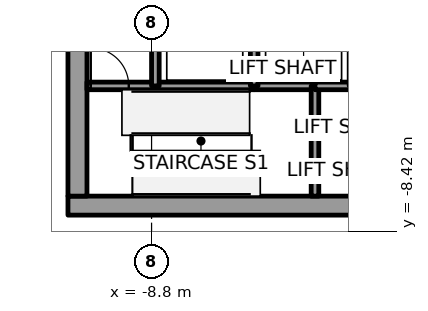
"""IFC4 building model, lengths in metres.
Left out: names, types, materials, properties, quantities, classifications, styles, units other than length and angle.
Written with IfcOpenShell. Run it as: python <this file> out.ifc"""

import sys

from ifc_helpers import new_model, si_unit, direction, frame, frame_2d, origin, place, context, subcontext, project, spatial, rectangle, extrude, element, fill, save


model = new_model("IFC4")
c1 = context("Model", 3, precision=1e-05, world=origin(), true_north=direction((0.0, 1.0)))
c2 = subcontext(c1, "Body", "Model", "MODEL_VIEW")
j1 = project(units=[si_unit("LENGTHUNIT", "METRE"), si_unit("PLANEANGLEUNIT", "RADIAN")], contexts=[c1])
p1 = place(None, origin())
s1 = spatial("IfcSite", under=j1, at=p1, CompositionType="ELEMENT")
p2 = place(p1, origin())
s2 = spatial("IfcBuilding", under=s1, at=p2, CompositionType="ELEMENT")
p3 = place(p2, frame((0.0, 0.0, 201.8)))
s3 = spatial("IfcBuildingStorey", under=s2, at=p3, CompositionType="ELEMENT", Elevation=201.8)
p4 = place(p3, frame((-11.0, -7.75, 0.0), z_axis=(0.0, 0.0, 1.0), x_axis=(1.0, 0.0, 0.0)))
e1 = element("IfcWall", 1, at=p4, inside=s3, PredefinedType="SHEAR", context=c2, shape_type="SweptSolid", body=[
    extrude(rectangle(XDim=22.0, YDim=0.5, at=frame_2d((11.0, 0.0))), origin(), (0.0, 0.0, 1.0), 4.0),
])
p5 = place(p4, frame((10.45, 0.0, 0.0)))
e2 = element("IfcOpeningElement", 2, at=p5, cuts=e1, PredefinedType="OPENING", context=c2, shape_type="SweptSolid", body=[
    extrude(rectangle(XDim=1.1, YDim=2.1, at=frame_2d((0.55, 1.05))), frame((0.0, 0.25, 0.0), z_axis=(0.0, -1.0, 0.0), x_axis=(1.0, 0.0, 0.0)), (0.0, 0.0, 1.0), 0.5),
])
p6 = place(p3, frame((-10.75, -7.5, 0.0), z_axis=(0.0, 0.0, 1.0), x_axis=(0.0, 1.0, 0.0)))
e3 = element("IfcWall", 3, at=p6, inside=s3, PredefinedType="SHEAR", context=c2, shape_type="SweptSolid", body=[
    extrude(rectangle(XDim=15.0, YDim=0.5, at=frame_2d((7.5, 0.0))), origin(), (0.0, 0.0, 1.0), 4.0),
])
p7 = place(p6, frame((6.6, 0.0, 0.0)))
e4 = element("IfcOpeningElement", 4, at=p7, cuts=e3, PredefinedType="OPENING", context=c2, shape_type="SweptSolid", body=[
    extrude(rectangle(XDim=1.8, YDim=2.1, at=frame_2d((0.9, 1.05))), frame((0.0, 0.25, 0.0), z_axis=(0.0, -1.0, 0.0), x_axis=(1.0, 0.0, 0.0)), (0.0, 0.0, 1.0), 0.5),
])
p8 = place(p3, frame((-10.5, -4.6, 0.0), z_axis=(0.0, 0.0, 1.0), x_axis=(1.0, 0.0, 0.0)))
e5 = element("IfcWall", 5, at=p8, inside=s3, PredefinedType="SOLIDWALL", context=c2, shape_type="SweptSolid", body=[
    extrude(rectangle(XDim=1.8, YDim=0.2, at=frame_2d((0.9, 0.0))), origin(), (0.0, 0.0, 1.0), 3.85),
])
p9 = place(p8, frame((0.1, 0.0, 0.0)))
e6 = element("IfcOpeningElement", 6, at=p9, cuts=e5, PredefinedType="OPENING", context=c2, shape_type="SweptSolid", body=[
    extrude(rectangle(XDim=1.0, YDim=2.1, at=frame_2d((0.5, 1.05))), frame((0.0, 0.1, 0.0), z_axis=(0.0, -1.0, 0.0), x_axis=(1.0, 0.0, 0.0)), (0.0, 0.0, 1.0), 0.2),
])
p10 = place(p3, frame((-8.7, -4.6, 0.0), z_axis=(0.0, 0.0, 1.0), x_axis=(1.0, 0.0, 0.0)))
e7 = element("IfcWall", 7, at=p10, inside=s3, PredefinedType="SOLIDWALL", context=c2, shape_type="SweptSolid", body=[
    extrude(rectangle(XDim=2.6, YDim=0.2, at=frame_2d((1.3, 0.0))), origin(), (0.0, 0.0, 1.0), 3.85),
])
p11 = place(p3, frame((-8.7, -4.6, 0.0), z_axis=(0.0, 0.0, 1.0), x_axis=(0.0, 1.0, 0.0)))
e8 = element("IfcWall", 8, at=p11, inside=s3, PredefinedType="SOLIDWALL", context=c2, shape_type="SweptSolid", body=[
    extrude(rectangle(XDim=2.8, YDim=0.2, at=frame_2d((1.4, 0.0))), origin(), (0.0, 0.0, 1.0), 3.85),
])
p12 = place(p3, frame((-6.1, -4.6, 0.0), z_axis=(0.0, 0.0, 1.0), x_axis=(1.0, 0.0, 0.0)))
e9 = element("IfcWall", 9, at=p12, inside=s3, PredefinedType="SOLIDWALL", context=c2, shape_type="SweptSolid", body=[
    extrude(rectangle(XDim=1.6, YDim=0.2, at=frame_2d((0.8, 0.0))), origin(), (0.0, 0.0, 1.0), 3.85),
])
p13 = place(p3, frame((-6.1, -4.6, 0.0), z_axis=(0.0, 0.0, 1.0), x_axis=(0.0, 1.0, 0.0)))
e10 = element("IfcWall", 10, at=p13, inside=s3, PredefinedType="SOLIDWALL", context=c2, shape_type="SweptSolid", body=[
    extrude(rectangle(XDim=2.8, YDim=0.2, at=frame_2d((1.4, 0.0))), origin(), (0.0, 0.0, 1.0), 3.85),
])
p14 = place(p3, frame((-4.5, -4.6, 0.0), z_axis=(0.0, 0.0, 1.0), x_axis=(0.0, -1.0, 0.0)))
e11 = element("IfcWall", 11, at=p14, inside=s3, PredefinedType="SOLIDWALL", context=c2, shape_type="SweptSolid", body=[
    extrude(rectangle(XDim=2.9, YDim=0.2, at=frame_2d((1.45, 0.0))), origin(), (0.0, 0.0, 1.0), 3.85),
])
p15 = place(p3, frame((-4.5, -4.6, 0.0), z_axis=(0.0, 0.0, 1.0), x_axis=(1.0, 0.0, 0.0)))
e12 = element("IfcWall", 12, at=p15, inside=s3, PredefinedType="SOLIDWALL", context=c2, shape_type="SweptSolid", body=[
    extrude(rectangle(XDim=1.0, YDim=0.2, at=frame_2d((0.5, 0.0))), origin(), (0.0, 0.0, 1.0), 3.85),
])
p16 = place(p9, origin())
e13 = element("IfcDoor", 13, at=p16, inside=s3, OperationType="SINGLE_SWING_LEFT", PredefinedType="DOOR", context=c2, shape_type="SweptSolid", body=[
    extrude(rectangle(XDim=1.0, YDim=2.1, at=frame_2d((0.5, 1.05))), frame((0.0, 0.025, 0.0), z_axis=(0.0, -1.0, 0.0), x_axis=(1.0, 0.0, 0.0)), (0.0, 0.0, 1.0), 0.05),
])
fill(e6, e13)
save(model, sys.argv[1])
